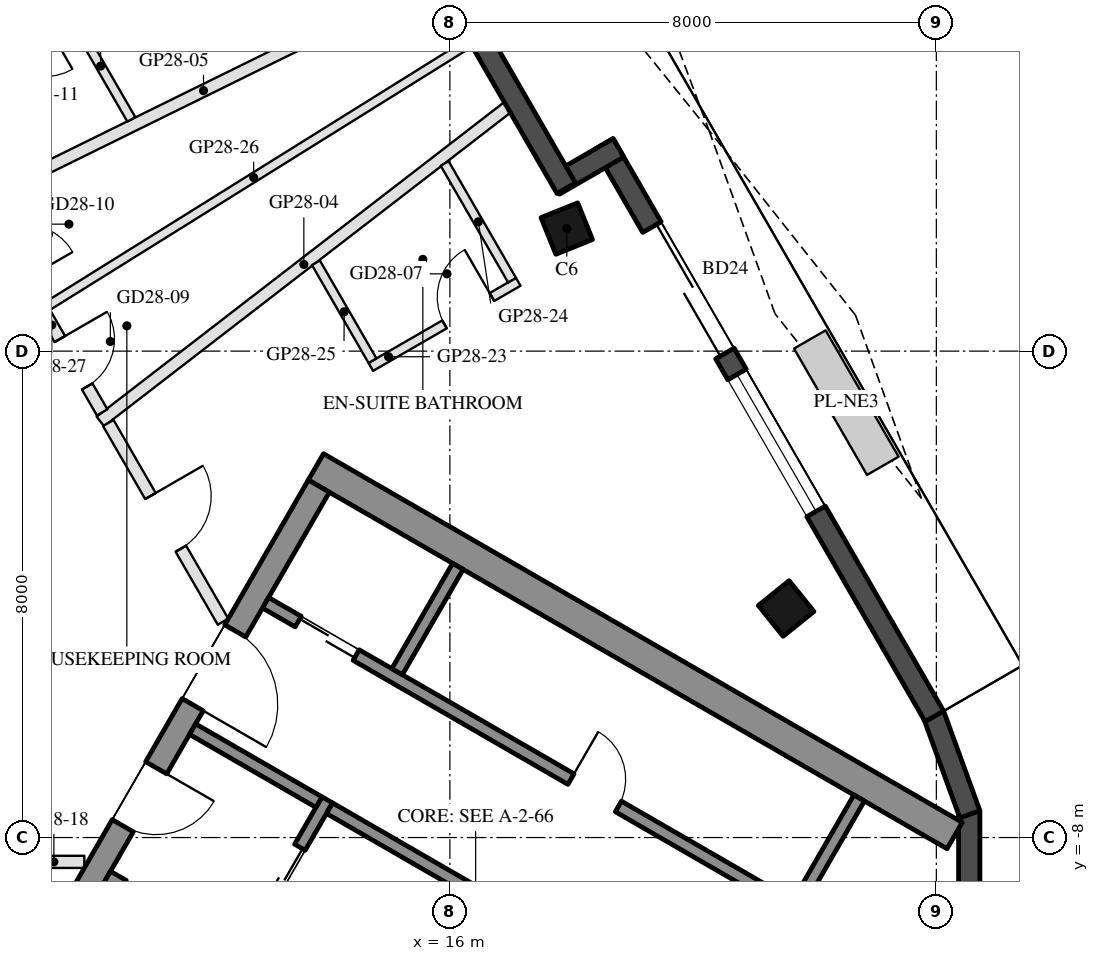
"""IFC4 building model, lengths in metres.
Left out: names, types, materials, properties, quantities, classifications, styles, units other than length and angle.
Written with IfcOpenShell. Run it as: python <this file> out.ifc"""

import sys

from ifc_helpers import new_model, si_unit, direction, frame, frame_2d, origin, origin_2d, place, context, subcontext, project, spatial, rectangle, hollow_rectangle, extrude, boolean, halfspace, element, fill, save


model = new_model("IFC4")
c1 = context("Model", 3, precision=1e-05, world=origin(), true_north=direction((0.0, 1.0)))
c2 = subcontext(c1, "Body", "Model", "MODEL_VIEW")
j1 = project(units=[si_unit("LENGTHUNIT", "METRE"), si_unit("PLANEANGLEUNIT", "RADIAN")], contexts=[c1])
p1 = place(None, origin())
s1 = spatial("IfcSite", under=j1, at=p1, CompositionType="ELEMENT")
p2 = place(p1, origin())
s2 = spatial("IfcBuilding", under=s1, at=p2, CompositionType="ELEMENT")
p3 = place(p2, frame((0.0, 0.0, 287.4)))
s3 = spatial("IfcBuildingStorey", under=s2, at=p3, CompositionType="ELEMENT", Elevation=287.4)
p4 = place(p3, frame((21.53, -4.233, 0.0), z_axis=(-0.190723355538, 0.02965081359, 0.981195918716), x_axis=(0.48832184533, -0.864229250401, 0.121035441609)))
e1 = element("IfcColumn", 1, at=p4, inside=s3, PredefinedType="COLUMN", context=c2, shape_type="SweptSolid", body=[
    boolean("DIFFERENCE", boolean("DIFFERENCE", extrude(hollow_rectangle(XDim=0.65, YDim=0.65, WallThickness=0.03, at=origin_2d()), origin(), (0.0, 0.0, 1.0), 3.771), halfspace(frame((0.0, 0.0, 0.047), z_axis=(0.0, 0.0, 1.0), x_axis=(1.0, 0.0, 0.0)), True)), halfspace(frame((0.0, 0.0, 3.724), z_axis=(0.0, 0.0, 1.0), x_axis=(1.0, 0.0, 0.0)), False)),
])
p5 = place(p3, frame((17.922, 2.016, 0.0), z_axis=(-0.161441555696, -0.022914285325, 0.986616216987), x_axis=(0.49507293815, -0.866715878813, 0.060879974747)))
e2 = element("IfcColumn", 2, at=p5, inside=s3, PredefinedType="COLUMN", context=c2, shape_type="SweptSolid", body=[
    boolean("DIFFERENCE", boolean("DIFFERENCE", extrude(hollow_rectangle(XDim=0.65, YDim=0.65, WallThickness=0.03, at=origin_2d()), origin(), (0.0, 0.0, 1.0), 3.75), halfspace(frame((0.0, 0.0, 0.04), z_axis=(0.0, 0.0, 1.0), x_axis=(1.0, 0.0, 0.0)), True)), halfspace(frame((0.0, 0.0, 3.711), z_axis=(0.0, 0.0, 1.0), x_axis=(1.0, 0.0, 0.0)), False)),
])
for number, where, z_axis, x_axis in (
    (3, (24.541, -9.302, 0.0), (0.0, 0.0, 1.0), (0.0, 1.0, 0.0)),
    (4, (24.552, -7.618, 0.0), (0.0, 0.0, 1.0), (-0.342, 0.94, 0.0)),
):
    element("IfcWall", number, at=place(p3, frame(where, z_axis=z_axis, x_axis=x_axis)), inside=s3, PredefinedType="SOLIDWALL", context=c2, shape_type="SweptSolid", body=[
        extrude(rectangle(XDim=1.745, YDim=0.35, at=frame_2d((0.872, 0.0))), origin(), (0.0, 0.0, 1.0), 3.55),
    ])
p6 = place(p3, frame((23.968, -6.006, 0.0), z_axis=(0.0, 0.0, 1.0), x_axis=(-0.500008899612, 0.86602026553, 0.0)))
e5 = element("IfcWall", 5, at=p6, inside=s3, PredefinedType="SOLIDWALL", context=c2, shape_type="SweptSolid", body=[
    extrude(rectangle(XDim=10.87, YDim=0.35, at=frame_2d((5.435, 0.0))), origin(), (0.0, 0.0, 1.0), 3.55),
])
p7 = place(p6, frame((6.891, 0.0, 0.0)))
e6 = element("IfcOpeningElement", 6, at=p7, cuts=e5, PredefinedType="OPENING", context=c2, shape_type="SweptSolid", body=[
    extrude(rectangle(XDim=2.4, YDim=2.4, at=frame_2d((1.2, 1.2))), frame((0.0, 0.185, 0.0), z_axis=(0.0, -1.0, 0.0), x_axis=(1.0, 0.0, 0.0)), (0.0, 0.0, 1.0), 0.37),
])
p8 = place(p6, frame((3.892, 0.0, 0.3)))
e7 = element("IfcOpeningElement", 7, at=p8, cuts=e5, PredefinedType="OPENING", context=c2, shape_type="SweptSolid", body=[
    extrude(rectangle(XDim=2.6, YDim=2.65, at=frame_2d((1.3, 1.325))), frame((0.0, 0.185, 0.0), z_axis=(0.0, -1.0, 0.0), x_axis=(1.0, 0.0, 0.0)), (0.0, 0.0, 1.0), 0.37),
])
p9 = place(p3, frame((18.772, 3.344, 0.0), z_axis=(0.0, 0.0, 1.0), x_axis=(-0.866005645448, -0.500034220881, 0.0)))
e8 = element("IfcWall", 8, at=p9, inside=s3, PredefinedType="SOLIDWALL", context=c2, shape_type="SweptSolid", body=[
    extrude(rectangle(XDim=1.22, YDim=0.35, at=frame_2d((0.61, 0.0))), origin(), (0.0, 0.0, 1.0), 3.55),
])
p10 = place(p3, frame((17.913, 2.68, 0.0), z_axis=(0.0, 0.0, 1.0), x_axis=(-0.499985371027, 0.866033849661, 0.0)))
e9 = element("IfcWall", 9, at=p10, inside=s3, PredefinedType="SOLIDWALL", context=c2, shape_type="SweptSolid", body=[
    extrude(rectangle(XDim=6.055, YDim=0.35, at=frame_2d((3.028, 0.0))), origin(), (0.0, 0.0, 1.0), 3.55),
])
p11 = place(p10, frame((4.59, 0.0, 0.0)))
e10 = element("IfcOpeningElement", 10, at=p11, cuts=e9, PredefinedType="OPENING", context=c2, shape_type="SweptSolid", body=[
    extrude(rectangle(XDim=1.1, YDim=2.4, at=frame_2d((0.55, 1.2))), frame((0.0, 0.185, 0.0), z_axis=(0.0, -1.0, 0.0), x_axis=(1.0, 0.0, 0.0)), (0.0, 0.0, 1.0), 0.37),
])
p12 = place(p3, frame((13.797, -1.903, 0.0), z_axis=(0.0, 0.0, 1.0), x_axis=(0.866024688907, -0.500001238203, 0.0)))
e11 = element("IfcWall", 11, at=p12, inside=s3, PredefinedType="SHEAR", context=c2, shape_type="SweptSolid", body=[
    extrude(rectangle(XDim=12.129, YDim=0.5, at=frame_2d((6.064, 0.0))), origin(), (0.0, 0.0, 1.0), 3.5),
])
p13 = place(p3, frame((8.845, -10.88, 0.0), z_axis=(0.0, 0.0, 1.0), x_axis=(0.500004234368, 0.866022959057, 0.0)))
e12 = element("IfcWall", 12, at=p13, inside=s3, PredefinedType="SHEAR", context=c2, shape_type="SweptSolid", body=[
    extrude(rectangle(XDim=10.0, YDim=0.4, at=frame_2d((5.0, 0.0))), origin(), (0.0, 0.0, 1.0), 3.5),
])
p14 = place(p13, frame((3.55, 0.0, 0.0)))
e13 = element("IfcOpeningElement", 13, at=p14, cuts=e12, PredefinedType="OPENING", context=c2, shape_type="SweptSolid", body=[
    extrude(rectangle(XDim=1.1, YDim=2.1, at=frame_2d((0.55, 1.05))), frame((0.0, 0.21, 0.0), z_axis=(0.0, -1.0, 0.0), x_axis=(1.0, 0.0, 0.0)), (0.0, 0.0, 1.0), 0.42),
])
p15 = place(p13, frame((5.85, 0.0, 0.0)))
e14 = element("IfcOpeningElement", 14, at=p15, cuts=e12, PredefinedType="OPENING", context=c2, shape_type="SweptSolid", body=[
    extrude(rectangle(XDim=1.4, YDim=2.1, at=frame_2d((0.7, 1.05))), frame((0.0, 0.21, 0.0), z_axis=(0.0, -1.0, 0.0), x_axis=(1.0, 0.0, 0.0)), (0.0, 0.0, 1.0), 0.42),
])
p16 = place(p3, frame((10.356, -8.664, 0.0), z_axis=(0.0, 0.0, 1.0), x_axis=(0.866028629588, -0.499994412703, 0.0)))
e15 = element("IfcWall", 15, at=p16, inside=s3, PredefinedType="SHEAR", context=c2, shape_type="SweptSolid", body=[
    extrude(rectangle(XDim=6.45, YDim=0.25, at=frame_2d((3.225, 0.0))), origin(), (0.0, 0.0, 1.0), 3.5),
])
p17 = place(p16, frame((0.3, 0.0, 0.0)))
e16 = element("IfcOpeningElement", 16, at=p17, cuts=e15, PredefinedType="OPENING", context=c2, shape_type="SweptSolid", body=[
    extrude(rectangle(XDim=1.0, YDim=2.1, at=frame_2d((0.5, 1.05))), frame((0.0, 0.135, 0.0), z_axis=(0.0, -1.0, 0.0), x_axis=(1.0, 0.0, 0.0)), (0.0, 0.0, 1.0), 0.27),
])
p18 = place(p3, frame((12.583, -9.805, 0.0), z_axis=(0.0, 0.0, 1.0), x_axis=(0.49994636267, 0.866056369097, 0.0)))
e17 = element("IfcWall", 17, at=p18, inside=s3, PredefinedType="SHEAR", context=c2, shape_type="SweptSolid", body=[
    extrude(rectangle(XDim=2.8, YDim=0.2, at=frame_2d((1.4, 0.0))), origin(), (0.0, 0.0, 1.0), 3.5),
])
p19 = place(p18, frame((0.7, 0.0, 0.0)))
e18 = element("IfcOpeningElement", 18, at=p19, cuts=e17, PredefinedType="OPENING", context=c2, shape_type="SweptSolid", body=[
    extrude(rectangle(XDim=1.2, YDim=2.1, at=frame_2d((0.6, 1.05))), frame((0.0, 0.11, 0.0), z_axis=(0.0, -1.0, 0.0), x_axis=(1.0, 0.0, 0.0)), (0.0, 0.0, 1.0), 0.22),
])
p20 = place(p3, frame((11.768, -6.217, 0.0), z_axis=(0.0, 0.0, 1.0), x_axis=(0.866050077142, -0.499957262057, 0.0)))
e19 = element("IfcWall", 19, at=p20, inside=s3, PredefinedType="SHEAR", context=c2, shape_type="SweptSolid", body=[
    extrude(rectangle(XDim=2.4, YDim=0.2, at=frame_2d((1.2, 0.0))), origin(), (0.0, 0.0, 1.0), 3.5),
])
p21 = place(p3, frame((14.02, -7.517, 0.0), z_axis=(0.0, 0.0, 1.0), x_axis=(0.866034573852, -0.49998411664, 0.0)))
e20 = element("IfcWall", 20, at=p21, inside=s3, PredefinedType="SHEAR", context=c2, shape_type="SweptSolid", body=[
    extrude(rectangle(XDim=2.8, YDim=0.2, at=frame_2d((1.4, 0.0))), origin(), (0.0, 0.0, 1.0), 3.5),
])
p22 = place(p3, frame((12.968, -4.138, 0.0), z_axis=(0.0, 0.0, 1.0), x_axis=(0.866028328073, -0.49999493495, 0.0)))
e21 = element("IfcWall", 21, at=p22, inside=s3, PredefinedType="SHEAR", context=c2, shape_type="SweptSolid", body=[
    extrude(rectangle(XDim=10.16, YDim=0.2, at=frame_2d((5.08, 0.0))), origin(), (0.0, 0.0, 1.0), 3.5),
])
p23 = place(p22, frame((0.62, 0.0, 0.0)))
e22 = element("IfcOpeningElement", 22, at=p23, cuts=e21, PredefinedType="OPENING", context=c2, shape_type="SweptSolid", body=[
    extrude(rectangle(XDim=1.1, YDim=2.1, at=frame_2d((0.55, 1.05))), frame((0.0, 0.11, 0.0), z_axis=(0.0, -1.0, 0.0), x_axis=(1.0, 0.0, 0.0)), (0.0, 0.0, 1.0), 0.22),
])
p24 = place(p22, frame((5.8, 0.0, 0.0)))
e23 = element("IfcOpeningElement", 23, at=p24, cuts=e21, PredefinedType="OPENING", context=c2, shape_type="SweptSolid", body=[
    extrude(rectangle(XDim=0.9, YDim=2.1, at=frame_2d((0.45, 1.05))), frame((0.0, 0.11, 0.0), z_axis=(0.0, -1.0, 0.0), x_axis=(1.0, 0.0, 0.0)), (0.0, 0.0, 1.0), 0.22),
])
for number, where, z_axis, x_axis in (
    (24, (15.131, -5.272, 0.0), (0.0, 0.0, 1.0), (0.5, 0.866, 0.0)),
    (25, (21.73, -9.082, 0.0), (0.0, 0.0, 1.0), (0.5, 0.866, 0.0)),
):
    element("IfcWall", number, at=place(p3, frame(where, z_axis=z_axis, x_axis=x_axis)), inside=s3, PredefinedType="SHEAR", context=c2, shape_type="SweptSolid", body=[
        extrude(rectangle(XDim=2.0, YDim=0.2, at=frame_2d((1.0, 0.0))), origin(), (0.0, 0.0, 1.0), 3.5),
    ])
p25 = place(p3, frame((16.945, 4.008, 0.0), z_axis=(0.0, 0.0, 1.0), x_axis=(-0.791722394734, -0.610881043801, 0.0)))
e26 = element("IfcWall", 26, at=p25, inside=s3, PredefinedType="PARTITIONING", context=c2, shape_type="SweptSolid", body=[
    extrude(rectangle(XDim=8.454, YDim=0.2, at=frame_2d((4.227, 0.0))), origin(), (0.0, 0.0, 1.0), 3.1),
])
p26 = place(p3, frame((15.715, 6.139, 0.0), z_axis=(0.0, 0.0, 1.0), x_axis=(-0.897120508699, -0.44178591294, 0.0)))
e27 = element("IfcWall", 27, at=p26, inside=s3, PredefinedType="PARTITIONING", context=c2, shape_type="SweptSolid", body=[
    extrude(rectangle(XDim=8.397, YDim=0.2, at=frame_2d((4.198, 0.0))), origin(), (0.0, 0.0, 1.0), 3.1),
])
p27 = place(p3, frame((9.988, -8.4, 0.0), z_axis=(0.0, 0.0, 1.0), x_axis=(-1.0, 0.0, 0.0)))
e28 = element("IfcWall", 28, at=p27, inside=s3, PredefinedType="PARTITIONING", context=c2, shape_type="SweptSolid", body=[
    extrude(rectangle(XDim=4.175, YDim=0.2, at=frame_2d((2.087, 0.0))), origin(), (0.0, 0.0, 1.0), 3.05),
])
p28 = place(p27, frame((1.587, 0.0, 0.0)))
e29 = element("IfcOpeningElement", 29, at=p28, cuts=e28, PredefinedType="OPENING", context=c2, shape_type="SweptSolid", body=[
    extrude(rectangle(XDim=1.0, YDim=2.1, at=frame_2d((0.5, 1.05))), frame((0.0, 0.11, 0.0), z_axis=(0.0, -1.0, 0.0), x_axis=(1.0, 0.0, 0.0)), (0.0, 0.0, 1.0), 0.22),
])
p29 = place(p3, frame((10.382, -1.182, 0.0), z_axis=(0.0, 0.0, 1.0), x_axis=(0.50002859319, -0.866008894869, 0.0)))
e30 = element("IfcWall", 30, at=p29, inside=s3, PredefinedType="PARTITIONING", context=c2, shape_type="SweptSolid", body=[
    extrude(rectangle(XDim=3.774, YDim=0.2, at=frame_2d((1.887, 0.0))), origin(), (0.0, 0.0, 1.0), 3.05),
])
p30 = place(p29, frame((1.387, 0.0, 0.0)))
e31 = element("IfcOpeningElement", 31, at=p30, cuts=e30, PredefinedType="OPENING", context=c2, shape_type="SweptSolid", body=[
    extrude(rectangle(XDim=1.0, YDim=2.1, at=frame_2d((0.5, 1.05))), frame((0.0, 0.11, 0.0), z_axis=(0.0, -1.0, 0.0), x_axis=(1.0, 0.0, 0.0)), (0.0, 0.0, 1.0), 0.22),
])
p31 = place(p3, frame((14.699, -0.26, 0.0), z_axis=(0.0, 0.0, 1.0), x_axis=(0.866034573852, 0.49998411664, 0.0)))
e32 = element("IfcWall", 32, at=p31, inside=s3, PredefinedType="PARTITIONING", context=c2, shape_type="SweptSolid", body=[
    extrude(rectangle(XDim=2.8, YDim=0.15, at=frame_2d((1.4, 0.0))), origin(), (0.0, 0.0, 1.0), 3.1),
])
p32 = place(p31, frame((1.4, 0.0, 0.0)))
e33 = element("IfcOpeningElement", 33, at=p32, cuts=e32, PredefinedType="OPENING", context=c2, shape_type="SweptSolid", body=[
    extrude(rectangle(XDim=0.9, YDim=2.1, at=frame_2d((0.45, 1.05))), frame((0.0, 0.085, 0.0), z_axis=(0.0, -1.0, 0.0), x_axis=(1.0, 0.0, 0.0)), (0.0, 0.0, 1.0), 0.17),
])
p33 = place(p3, frame((17.022, 1.167, 0.0), z_axis=(0.0, 0.0, 1.0), x_axis=(-0.499954515395, 0.866051662741, 0.0)))
e34 = element("IfcWall", 34, at=p33, inside=s3, PredefinedType="PARTITIONING", context=c2, shape_type="SweptSolid", body=[
    extrude(rectangle(XDim=2.216, YDim=0.15, at=frame_2d((1.108, 0.0))), origin(), (0.0, 0.0, 1.0), 3.05),
])
p34 = place(p3, frame((14.727, -0.158, 0.0), z_axis=(0.0, 0.0, 1.0), x_axis=(-0.499964847546, 0.866045698112, 0.0)))
e35 = element("IfcWall", 35, at=p34, inside=s3, PredefinedType="PARTITIONING", context=c2, shape_type="SweptSolid", body=[
    extrude(rectangle(XDim=1.86, YDim=0.15, at=frame_2d((0.93, 0.0))), origin(), (0.0, 0.0, 1.0), 3.05),
])
p35 = place(p3, frame((16.33, 5.074, 0.0), z_axis=(0.0, 0.0, 1.0), x_axis=(-0.848469139967, -0.52924485687, 0.0)))
e36 = element("IfcWall", 36, at=p35, inside=s3, PredefinedType="PARTITIONING", context=c2, shape_type="SweptSolid", body=[
    extrude(rectangle(XDim=8.384, YDim=0.15, at=frame_2d((4.192, 0.0))), origin(), (0.0, 0.0, 1.0), 3.1),
])
p36 = place(p3, frame((9.339, 0.625, 0.0), z_axis=(0.0, 0.0, 1.0), x_axis=(0.499999106059, -0.866025919901, 0.0)))
e37 = element("IfcWall", 37, at=p36, inside=s3, PredefinedType="PARTITIONING", context=c2, shape_type="SweptSolid", body=[
    extrude(rectangle(XDim=1.884, YDim=0.2, at=frame_2d((0.942, 0.0))), origin(), (0.0, 0.0, 1.0), 3.55),
])
p37 = place(p36, frame((0.492, 0.0, 0.0)))
e38 = element("IfcOpeningElement", 38, at=p37, cuts=e37, PredefinedType="OPENING", context=c2, shape_type="SweptSolid", body=[
    extrude(rectangle(XDim=0.9, YDim=2.1, at=frame_2d((0.45, 1.05))), frame((0.0, 0.11, 0.0), z_axis=(0.0, -1.0, 0.0), x_axis=(1.0, 0.0, 0.0)), (0.0, 0.0, 1.0), 0.22),
])
p38 = place(p3, frame((9.777, 5.666, 0.0), z_axis=(0.0, 0.0, 1.0), x_axis=(-0.865996816683, -0.500049511043, 0.0)))
e39 = element("IfcWall", 39, at=p38, inside=s3, PredefinedType="PARTITIONING", context=c2, shape_type="SweptSolid", body=[
    extrude(rectangle(XDim=2.8, YDim=0.15, at=frame_2d((1.4, 0.0))), origin(), (0.0, 0.0, 1.0), 3.05),
])
p39 = place(p38, frame((0.5, 0.0, 0.0)))
e40 = element("IfcOpeningElement", 40, at=p39, cuts=e39, PredefinedType="OPENING", context=c2, shape_type="SweptSolid", body=[
    extrude(rectangle(XDim=0.9, YDim=2.1, at=frame_2d((0.45, 1.05))), frame((0.0, 0.085, 0.0), z_axis=(0.0, -1.0, 0.0), x_axis=(1.0, 0.0, 0.0)), (0.0, 0.0, 1.0), 0.17),
])
p40 = place(p3, frame((10.761, 3.811, 0.0), z_axis=(0.0, 0.0, 1.0), x_axis=(-0.499941815747, 0.866058993873, 0.0)))
e41 = element("IfcWall", 41, at=p40, inside=s3, PredefinedType="PARTITIONING", context=c2, shape_type="SweptSolid", body=[
    extrude(rectangle(XDim=2.023, YDim=0.15, at=frame_2d((1.012, 0.0))), origin(), (0.0, 0.0, 1.0), 3.05),
])
p41 = place(p7, frame((2.4, 0.0, 0.0), z_axis=(0.0, 0.0, 1.0), x_axis=(-1.0, 0.0, 0.0)))
e42 = element("IfcDoor", 42, at=p41, inside=s3, OperationType="SLIDING_TO_LEFT", PredefinedType="DOOR", context=c2, shape_type="SweptSolid", body=[
    extrude(rectangle(XDim=2.4, YDim=2.4, at=frame_2d((1.2, 1.2))), frame((0.0, 0.025, 0.0), z_axis=(0.0, -1.0, 0.0), x_axis=(1.0, 0.0, 0.0)), (0.0, 0.0, 1.0), 0.05),
])
fill(e6, e42)
p42 = place(p8, origin())
e43 = element("IfcWindow", 43, at=p42, inside=s3, PartitioningType="SINGLE_PANEL", PredefinedType="WINDOW", context=c2, shape_type="SweptSolid", body=[
    extrude(rectangle(XDim=2.6, YDim=2.65, at=frame_2d((1.3, 1.325))), frame((0.0, 0.03, 0.0), z_axis=(0.0, -1.0, 0.0), x_axis=(1.0, 0.0, 0.0)), (0.0, 0.0, 1.0), 0.06),
])
fill(e7, e43)
p43 = place(p19, origin())
e44 = element("IfcDoor", 44, at=p43, inside=s3, OperationType="DOUBLE_DOOR_SLIDING", PredefinedType="DOOR", context=c2, shape_type="SweptSolid", body=[
    extrude(rectangle(XDim=1.2, YDim=2.1, at=frame_2d((0.6, 1.05))), frame((0.0, 0.025, 0.0), z_axis=(0.0, -1.0, 0.0), x_axis=(1.0, 0.0, 0.0)), (0.0, 0.0, 1.0), 0.05),
])
fill(e18, e44)
p44 = place(p23, origin())
e45 = element("IfcDoor", 45, at=p44, inside=s3, OperationType="DOUBLE_DOOR_SLIDING", PredefinedType="DOOR", context=c2, shape_type="SweptSolid", body=[
    extrude(rectangle(XDim=1.1, YDim=2.1, at=frame_2d((0.55, 1.05))), frame((0.0, 0.025, 0.0), z_axis=(0.0, -1.0, 0.0), x_axis=(1.0, 0.0, 0.0)), (0.0, 0.0, 1.0), 0.05),
])
fill(e22, e45)
p45 = place(p24, origin())
e46 = element("IfcDoor", 46, at=p45, inside=s3, OperationType="SINGLE_SWING_LEFT", PredefinedType="DOOR", context=c2, shape_type="SweptSolid", body=[
    extrude(rectangle(XDim=0.9, YDim=2.1, at=frame_2d((0.45, 1.05))), frame((0.0, 0.025, 0.0), z_axis=(0.0, -1.0, 0.0), x_axis=(1.0, 0.0, 0.0)), (0.0, 0.0, 1.0), 0.05),
])
fill(e23, e46)
p46 = place(p14, frame((1.1, 0.0, 0.0), z_axis=(0.0, 0.0, 1.0), x_axis=(-1.0, 0.0, 0.0)))
e47 = element("IfcDoor", 47, at=p46, inside=s3, OperationType="SINGLE_SWING_LEFT", PredefinedType="DOOR", context=c2, shape_type="SweptSolid", body=[
    extrude(rectangle(XDim=1.1, YDim=2.1, at=frame_2d((0.55, 1.05))), frame((0.0, 0.025, 0.0), z_axis=(0.0, -1.0, 0.0), x_axis=(1.0, 0.0, 0.0)), (0.0, 0.0, 1.0), 0.05),
])
fill(e13, e47)
p47 = place(p15, frame((1.4, 0.0, 0.0), z_axis=(0.0, 0.0, 1.0), x_axis=(-1.0, 0.0, 0.0)))
e48 = element("IfcDoor", 48, at=p47, inside=s3, OperationType="DOUBLE_DOOR_SINGLE_SWING", PredefinedType="DOOR", context=c2, shape_type="SweptSolid", body=[
    extrude(rectangle(XDim=1.4, YDim=2.1, at=frame_2d((0.7, 1.05))), frame((0.0, 0.025, 0.0), z_axis=(0.0, -1.0, 0.0), x_axis=(1.0, 0.0, 0.0)), (0.0, 0.0, 1.0), 0.05),
])
fill(e14, e48)
p48 = place(p32, origin())
e49 = element("IfcDoor", 49, at=p48, inside=s3, OperationType="SINGLE_SWING_RIGHT", PredefinedType="DOOR", context=c2, shape_type="SweptSolid", body=[
    extrude(rectangle(XDim=0.9, YDim=2.1, at=frame_2d((0.45, 1.05))), frame((0.0, 0.025, 0.0), z_axis=(0.0, -1.0, 0.0), x_axis=(1.0, 0.0, 0.0)), (0.0, 0.0, 1.0), 0.05),
])
fill(e33, e49)
p49 = place(p30, origin())
e50 = element("IfcDoor", 50, at=p49, inside=s3, OperationType="SINGLE_SWING_LEFT", PredefinedType="DOOR", context=c2, shape_type="SweptSolid", body=[
    extrude(rectangle(XDim=1.0, YDim=2.1, at=frame_2d((0.5, 1.05))), frame((0.0, 0.025, 0.0), z_axis=(0.0, -1.0, 0.0), x_axis=(1.0, 0.0, 0.0)), (0.0, 0.0, 1.0), 0.05),
])
fill(e31, e50)
p50 = place(p37, origin())
e51 = element("IfcDoor", 51, at=p50, inside=s3, OperationType="SINGLE_SWING_LEFT", PredefinedType="DOOR", context=c2, shape_type="SweptSolid", body=[
    extrude(rectangle(XDim=0.9, YDim=2.1, at=frame_2d((0.45, 1.05))), frame((0.0, 0.025, 0.0), z_axis=(0.0, -1.0, 0.0), x_axis=(1.0, 0.0, 0.0)), (0.0, 0.0, 1.0), 0.05),
])
fill(e38, e51)
save(model, sys.argv[1])
